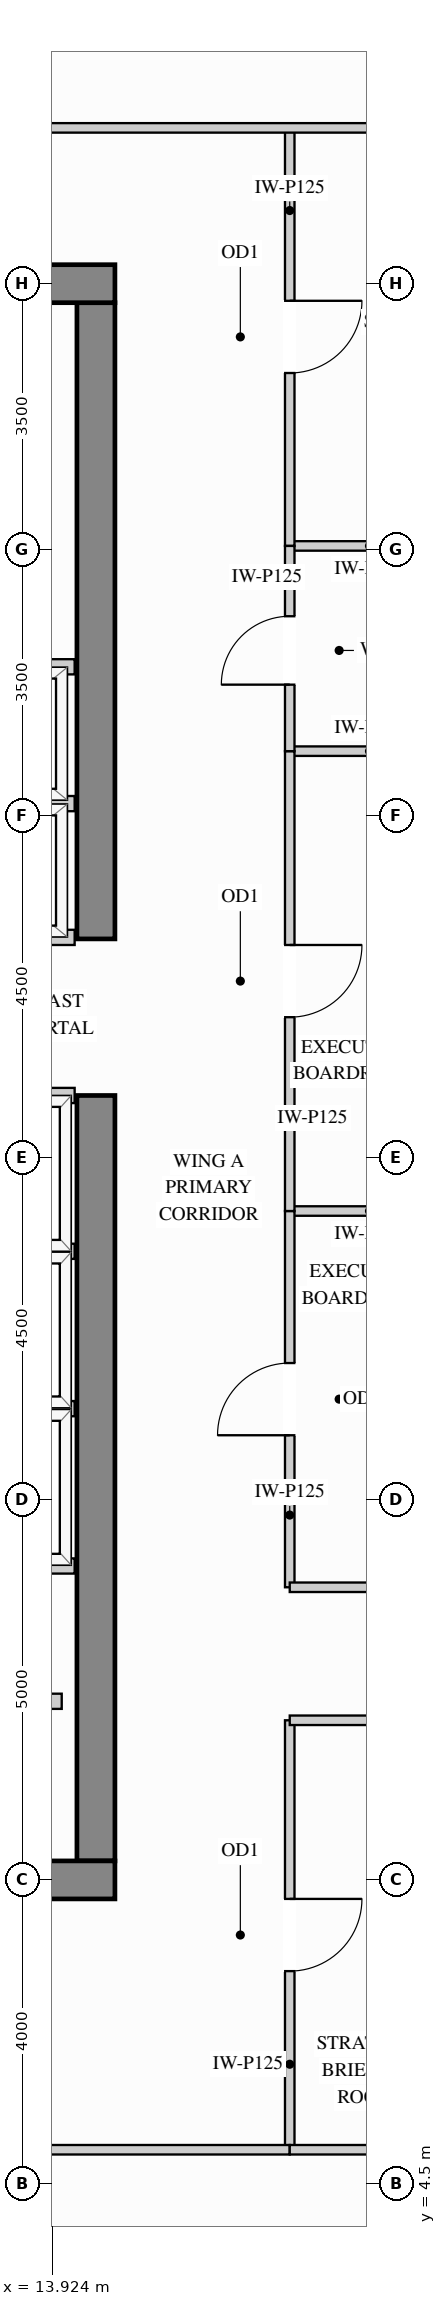
"""IFC4 building model, lengths in metres.
Left out: names, types, materials, properties, quantities, classifications, styles, units other than length and angle.
Written with IfcOpenShell. Run it as: python <this file> out.ifc"""

import sys

from ifc_helpers import new_model, si_unit, direction, frame, frame_2d, origin, place, context, subcontext, project, spatial, rectangle, extrude, source, transform, mapped, element, fill, save


model = new_model("IFC4")
c1 = context("Model", 3, precision=1e-05, world=origin(), true_north=direction((0.0, 1.0)))
c2 = subcontext(c1, "Body", "Model", "MODEL_VIEW")
j1 = project(units=[si_unit("LENGTHUNIT", "METRE"), si_unit("PLANEANGLEUNIT", "RADIAN")], contexts=[c1])
p1 = place(None, origin())
s1 = spatial("IfcSite", under=j1, at=p1, CompositionType="ELEMENT")
p2 = place(p1, origin())
s2 = spatial("IfcBuilding", under=s1, at=p2, CompositionType="ELEMENT")
p3 = place(p2, frame((0.0, 0.0, 244.8)))
s3 = spatial("IfcBuildingStorey", under=s2, at=p3, CompositionType="ELEMENT", Elevation=244.8)
m1 = source(origin(), c2, "Body", "SweptSolid", [
    extrude(rectangle(XDim=10.07, YDim=0.5, at=frame_2d((5.035, 0.0))), origin(), (0.0, 0.0, 1.0), 3.4),
])
p4 = place(p3, frame((14.5, 8.75, 0.0), z_axis=(0.0, 0.0, 1.0), x_axis=(0.0, 1.0, 0.0)))
e1 = element("IfcWall", 1, at=p4, inside=s3, PredefinedType="SHEAR", context=c2, shape_type="MappedRepresentation", body=[
    mapped(m1, transform((0.0, 0.0, 0.0), x_axis=(1.0, 0.0, 0.0), y_axis=(0.0, 1.0, 0.0), z_axis=(0.0, 0.0, 1.0))),
])
m2 = source(origin(), c2, "Body", "SweptSolid", [
    extrude(rectangle(XDim=8.37, YDim=0.5, at=frame_2d((4.185, 0.0))), origin(), (0.0, 0.0, 1.0), 3.4),
])
p5 = place(p3, frame((14.5, 20.88, 0.0), z_axis=(0.0, 0.0, 1.0), x_axis=(0.0, 1.0, 0.0)))
e2 = element("IfcWall", 2, at=p5, inside=s3, PredefinedType="SHEAR", context=c2, shape_type="MappedRepresentation", body=[
    mapped(m2, transform((0.0, 0.0, 0.0), x_axis=(1.0, 0.0, 0.0), y_axis=(0.0, 1.0, 0.0), z_axis=(0.0, 0.0, 1.0))),
])
m3 = source(origin(), c2, "Body", "SweptSolid", [
    extrude(rectangle(XDim=10.5, YDim=0.5, at=frame_2d((5.25, 0.0))), origin(), (0.0, 0.0, 1.0), 3.4),
])
for number, where, z_axis, x_axis in (
    (3, (4.25, 29.5, 0.0), (0.0, 0.0, 1.0), (1.0, 0.0, 0.0)),
    (4, (4.25, 8.5, 0.0), (0.0, 0.0, 1.0), (1.0, 0.0, 0.0)),
):
    element("IfcWall", number, at=place(p3, frame(where, z_axis=z_axis, x_axis=x_axis)), inside=s3, PredefinedType="SHEAR", context=c2, shape_type="MappedRepresentation", body=[
        mapped(m3, transform((0.0, 0.0, 0.0), x_axis=(1.0, 0.0, 0.0), y_axis=(0.0, 1.0, 0.0), z_axis=(0.0, 0.0, 1.0))),
    ])
m4 = source(origin(), c2, "Body", "SweptSolid", [
    extrude(rectangle(XDim=2.098, YDim=0.125, at=frame_2d((1.049, 0.0))), origin(), (0.0, 0.0, 1.0), 3.385),
])
for number, where, z_axis, x_axis in (
    (5, (17.05, 17.3, 0.0), (0.0, 0.0, 1.0), (1.0, 0.0, 0.0)),
    (6, (17.05, 23.35, 0.0), (0.0, 0.0, 1.0), (1.0, 0.0, 0.0)),
    (7, (17.05, 26.05, 0.0), (0.0, 0.0, 1.0), (1.0, 0.0, 0.0)),
):
    element("IfcWall", number, at=place(p3, frame(where, z_axis=z_axis, x_axis=x_axis)), inside=s3, PredefinedType="PARTITIONING", context=c2, shape_type="MappedRepresentation", body=[
        mapped(m4, transform((0.0, 0.0, 0.0), x_axis=(1.0, 0.0, 0.0), y_axis=(0.0, 1.0, 0.0), z_axis=(0.0, 0.0, 1.0))),
    ])
p6 = place(p3, frame((17.05, 12.35, 0.0), z_axis=(0.0, 0.0, 1.0), x_axis=(0.0, 1.0, 0.0)))
e8 = element("IfcWall", 8, at=p6, inside=s3, PredefinedType="PARTITIONING", context=c2, shape_type="SweptSolid", body=[
    extrude(rectangle(XDim=4.95, YDim=0.125, at=frame_2d((2.475, 0.0))), origin(), (0.0, 0.0, 1.0), 3.385),
])
p7 = place(p6, frame((2.0, 0.0, 0.0)))
e9 = element("IfcOpeningElement", 9, at=p7, cuts=e8, PredefinedType="OPENING", context=c2, shape_type="SweptSolid", body=[
    extrude(rectangle(XDim=0.95, YDim=2.15, at=frame_2d((0.475, 1.075))), frame((0.0, 0.073, 0.0), z_axis=(0.0, -1.0, 0.0), x_axis=(1.0, 0.0, 0.0)), (0.0, 0.0, 1.0), 0.145),
])
p8 = place(p3, frame((17.05, 17.3, 0.0), z_axis=(0.0, 0.0, 1.0), x_axis=(0.0, 1.0, 0.0)))
e10 = element("IfcWall", 10, at=p8, inside=s3, PredefinedType="PARTITIONING", context=c2, shape_type="SweptSolid", body=[
    extrude(rectangle(XDim=6.05, YDim=0.125, at=frame_2d((3.025, 0.0))), origin(), (0.0, 0.0, 1.0), 3.385),
])
p9 = place(p8, frame((2.55, 0.0, 0.0)))
e11 = element("IfcOpeningElement", 11, at=p9, cuts=e10, PredefinedType="OPENING", context=c2, shape_type="SweptSolid", body=[
    extrude(rectangle(XDim=0.95, YDim=2.15, at=frame_2d((0.475, 1.075))), frame((0.0, 0.073, 0.0), z_axis=(0.0, -1.0, 0.0), x_axis=(1.0, 0.0, 0.0)), (0.0, 0.0, 1.0), 0.145),
])
p10 = place(p3, frame((17.05, 26.05, 0.0), z_axis=(0.0, 0.0, 1.0), x_axis=(0.0, 1.0, 0.0)))
e12 = element("IfcWall", 12, at=p10, inside=s3, PredefinedType="PARTITIONING", context=c2, shape_type="SweptSolid", body=[
    extrude(rectangle(XDim=5.5, YDim=0.125, at=frame_2d((2.75, 0.0))), origin(), (0.0, 0.0, 1.0), 3.385),
])
p11 = place(p10, frame((2.275, 0.0, 0.0)))
e13 = element("IfcOpeningElement", 13, at=p11, cuts=e12, PredefinedType="OPENING", context=c2, shape_type="SweptSolid", body=[
    extrude(rectangle(XDim=0.95, YDim=2.15, at=frame_2d((0.475, 1.075))), frame((0.0, 0.073, 0.0), z_axis=(0.0, -1.0, 0.0), x_axis=(1.0, 0.0, 0.0)), (0.0, 0.0, 1.0), 0.145),
])
p12 = place(p3, frame((17.05, 4.95, 0.0), z_axis=(0.0, 0.0, 1.0), x_axis=(0.0, 1.0, 0.0)))
e14 = element("IfcWall", 14, at=p12, inside=s3, PredefinedType="PARTITIONING", context=c2, shape_type="SweptSolid", body=[
    extrude(rectangle(XDim=5.65, YDim=0.125, at=frame_2d((2.825, 0.0))), origin(), (0.0, 0.0, 1.0), 3.385),
])
p13 = place(p12, frame((2.35, 0.0, 0.0)))
e15 = element("IfcOpeningElement", 15, at=p13, cuts=e14, PredefinedType="OPENING", context=c2, shape_type="SweptSolid", body=[
    extrude(rectangle(XDim=0.95, YDim=2.15, at=frame_2d((0.475, 1.075))), frame((0.0, 0.073, 0.0), z_axis=(0.0, -1.0, 0.0), x_axis=(1.0, 0.0, 0.0)), (0.0, 0.0, 1.0), 0.145),
])
p14 = place(p3, frame((17.05, 23.35, 0.0), z_axis=(0.0, 0.0, 1.0), x_axis=(0.0, 1.0, 0.0)))
e16 = element("IfcWall", 16, at=p14, inside=s3, PredefinedType="PARTITIONING", context=c2, shape_type="SweptSolid", body=[
    extrude(rectangle(XDim=2.7, YDim=0.125, at=frame_2d((1.35, 0.0))), origin(), (0.0, 0.0, 1.0), 3.385),
])
p15 = place(p14, frame((0.875, 0.0, 0.0)))
e17 = element("IfcOpeningElement", 17, at=p15, cuts=e16, PredefinedType="OPENING", context=c2, shape_type="SweptSolid", body=[
    extrude(rectangle(XDim=0.9, YDim=2.15, at=frame_2d((0.45, 1.075))), frame((0.0, 0.073, 0.0), z_axis=(0.0, -1.0, 0.0), x_axis=(1.0, 0.0, 0.0)), (0.0, 0.0, 1.0), 0.145),
])
m5 = source(origin(), c2, "Body", "SweptSolid", [
    extrude(rectangle(XDim=5.798, YDim=0.125, at=frame_2d((2.899, 0.0))), origin(), (0.0, 0.0, 1.0), 3.385),
])
p16 = place(p3, frame((13.35, 31.55, 0.0), z_axis=(0.0, 0.0, 1.0), x_axis=(1.0, 0.0, 0.0)))
e18 = element("IfcWall", 18, at=p16, inside=s3, PredefinedType="PARTITIONING", context=c2, shape_type="MappedRepresentation", body=[
    mapped(m5, transform((0.0, 0.0, 0.0), x_axis=(1.0, 0.0, 0.0), y_axis=(0.0, 1.0, 0.0), z_axis=(0.0, 0.0, 1.0))),
])
m6 = source(origin(), c2, "Body", "SweptSolid", [
    extrude(rectangle(XDim=2.45, YDim=0.125, at=frame_2d((1.225, 0.0))), origin(), (0.0, 0.0, 1.0), 3.385),
])
for number, where, z_axis, x_axis in (
    (19, (17.05, 12.35, 0.0), (0.0, 0.0, 1.0), (1.0, 0.0, 0.0)),
    (20, (17.05, 10.6, 0.0), (0.0, 0.0, 1.0), (1.0, 0.0, 0.0)),
):
    element("IfcWall", number, at=place(p3, frame(where, z_axis=z_axis, x_axis=x_axis)), inside=s3, PredefinedType="PARTITIONING", context=c2, shape_type="MappedRepresentation", body=[
        mapped(m6, transform((0.0, 0.0, 0.0), x_axis=(1.0, 0.0, 0.0), y_axis=(0.0, 1.0, 0.0), z_axis=(0.0, 0.0, 1.0))),
    ])
p17 = place(p3, frame((2.45, 4.95, 0.0), z_axis=(0.0, 0.0, 1.0), x_axis=(1.0, 0.0, 0.0)))
e21 = element("IfcWall", 21, at=p17, inside=s3, PredefinedType="PARTITIONING", context=c2, shape_type="SweptSolid", body=[
    extrude(rectangle(XDim=14.6, YDim=0.125, at=frame_2d((7.3, 0.0))), origin(), (0.0, 0.0, 1.0), 2.848),
])
p18 = place(p17, frame((6.825, 0.0, 0.0)))
e22 = element("IfcOpeningElement", 22, at=p18, cuts=e21, PredefinedType="OPENING", context=c2, shape_type="SweptSolid", body=[
    extrude(rectangle(XDim=0.95, YDim=2.15, at=frame_2d((0.475, 1.075))), frame((0.0, 0.073, 0.0), z_axis=(0.0, -1.0, 0.0), x_axis=(1.0, 0.0, 0.0)), (0.0, 0.0, 1.0), 0.145),
])
m7 = source(origin(), c2, "Body", "SweptSolid", [
    extrude(rectangle(XDim=2.098, YDim=0.125, at=frame_2d((1.049, 0.0))), origin(), (0.0, 0.0, 1.0), 2.848),
])
p19 = place(p3, frame((17.05, 4.95, 0.0), z_axis=(0.0, 0.0, 1.0), x_axis=(1.0, 0.0, 0.0)))
e23 = element("IfcWall", 23, at=p19, inside=s3, PredefinedType="PARTITIONING", context=c2, shape_type="MappedRepresentation", body=[
    mapped(m7, transform((0.0, 0.0, 0.0), x_axis=(1.0, 0.0, 0.0), y_axis=(0.0, 1.0, 0.0), z_axis=(0.0, 0.0, 1.0))),
])
m8 = source(origin(), c2, "Body", "SweptSolid", [
    extrude(rectangle(XDim=1.63, YDim=0.2, at=frame_2d((0.815, 0.0))), origin(), (0.0, 0.0, 1.0), 3.385),
])
p20 = place(p3, frame((12.42, 10.85, 0.0), z_axis=(0.0, 0.0, 1.0), x_axis=(1.0, 0.0, 0.0)))
e24 = element("IfcWall", 24, at=p20, inside=s3, PredefinedType="PARTITIONING", context=c2, shape_type="MappedRepresentation", body=[
    mapped(m8, transform((0.0, 0.0, 0.0), x_axis=(1.0, 0.0, 0.0), y_axis=(0.0, 1.0, 0.0), z_axis=(0.0, 0.0, 1.0))),
])
m9 = source(origin(), c2, "Body", "SweptSolid", [
    extrude(rectangle(XDim=2.39, YDim=0.2, at=frame_2d((1.195, 0.0))), origin(), (0.0, 0.0, 1.0), 3.385),
])
for number, where, z_axis, x_axis in (
    (25, (11.83, 22.66, 0.0), (0.0, 0.0, 1.0), (1.0, 0.0, 0.0)),
    (26, (11.83, 20.9, 0.0), (0.0, 0.0, 1.0), (1.0, 0.0, 0.0)),
    (27, (11.83, 24.46, 0.0), (0.0, 0.0, 1.0), (1.0, 0.0, 0.0)),
):
    element("IfcWall", number, at=place(p3, frame(where, z_axis=z_axis, x_axis=x_axis)), inside=s3, PredefinedType="PARTITIONING", context=c2, shape_type="MappedRepresentation", body=[
        mapped(m9, transform((0.0, 0.0, 0.0), x_axis=(1.0, 0.0, 0.0), y_axis=(0.0, 1.0, 0.0), z_axis=(0.0, 0.0, 1.0))),
    ])
m10 = source(origin(), c2, "Body", "SweptSolid", [
    extrude(rectangle(XDim=1.99, YDim=0.2, at=frame_2d((0.995, 0.0))), origin(), (0.0, 0.0, 1.0), 3.385),
])
for number, where, z_axis, x_axis in (
    (28, (12.23, 14.7, 0.0), (0.0, 0.0, 1.0), (1.0, 0.0, 0.0)),
    (29, (12.23, 12.63, 0.0), (0.0, 0.0, 1.0), (1.0, 0.0, 0.0)),
    (30, (12.23, 16.77, 0.0), (0.0, 0.0, 1.0), (1.0, 0.0, 0.0)),
    (31, (12.23, 18.82, 0.0), (0.0, 0.0, 1.0), (1.0, 0.0, 0.0)),
):
    element("IfcWall", number, at=place(p3, frame(where, z_axis=z_axis, x_axis=x_axis)), inside=s3, PredefinedType="PARTITIONING", context=c2, shape_type="MappedRepresentation", body=[
        mapped(m10, transform((0.0, 0.0, 0.0), x_axis=(1.0, 0.0, 0.0), y_axis=(0.0, 1.0, 0.0), z_axis=(0.0, 0.0, 1.0))),
    ])
m11 = source(origin(), c2, "Body", "SweptSolid", [
    extrude(rectangle(XDim=0.95, YDim=2.15, at=frame_2d((0.475, 1.075))), frame((0.0, 0.025, 0.0), z_axis=(0.0, -1.0, 0.0), x_axis=(1.0, 0.0, 0.0)), (0.0, 0.0, 1.0), 0.05),
])
p21 = place(p13, origin())
e32 = element("IfcDoor", 32, at=p21, inside=s3, OperationType="SINGLE_SWING_RIGHT", PredefinedType="DOOR", context=c2, shape_type="MappedRepresentation", body=[
    mapped(m11, transform((0.0, 0.0, 0.0), x_axis=(1.0, 0.0, 0.0), y_axis=(0.0, 1.0, 0.0), z_axis=(0.0, 0.0, 1.0))),
])
fill(e15, e32)
p22 = place(p7, origin())
e33 = element("IfcDoor", 33, at=p22, inside=s3, OperationType="SINGLE_SWING_LEFT", PredefinedType="DOOR", context=c2, shape_type="MappedRepresentation", body=[
    mapped(m11, transform((0.0, 0.0, 0.0), x_axis=(1.0, 0.0, 0.0), y_axis=(0.0, 1.0, 0.0), z_axis=(0.0, 0.0, 1.0))),
])
fill(e9, e33)
p23 = place(p9, origin())
e34 = element("IfcDoor", 34, at=p23, inside=s3, OperationType="SINGLE_SWING_RIGHT", PredefinedType="DOOR", context=c2, shape_type="MappedRepresentation", body=[
    mapped(m11, transform((0.0, 0.0, 0.0), x_axis=(1.0, 0.0, 0.0), y_axis=(0.0, 1.0, 0.0), z_axis=(0.0, 0.0, 1.0))),
])
fill(e11, e34)
p24 = place(p11, origin())
e35 = element("IfcDoor", 35, at=p24, inside=s3, OperationType="SINGLE_SWING_RIGHT", PredefinedType="DOOR", context=c2, shape_type="MappedRepresentation", body=[
    mapped(m11, transform((0.0, 0.0, 0.0), x_axis=(1.0, 0.0, 0.0), y_axis=(0.0, 1.0, 0.0), z_axis=(0.0, 0.0, 1.0))),
])
fill(e13, e35)
m12 = source(origin(), c2, "Body", "SweptSolid", [
    extrude(rectangle(XDim=0.9, YDim=2.15, at=frame_2d((0.45, 1.075))), frame((0.0, 0.025, 0.0), z_axis=(0.0, -1.0, 0.0), x_axis=(1.0, 0.0, 0.0)), (0.0, 0.0, 1.0), 0.05),
])
p25 = place(p15, origin())
e36 = element("IfcDoor", 36, at=p25, inside=s3, OperationType="SINGLE_SWING_LEFT", PredefinedType="DOOR", context=c2, shape_type="MappedRepresentation", body=[
    mapped(m12, transform((0.0, 0.0, 0.0), x_axis=(1.0, 0.0, 0.0), y_axis=(0.0, 1.0, 0.0), z_axis=(0.0, 0.0, 1.0))),
])
fill(e17, e36)
save(model, sys.argv[1])
